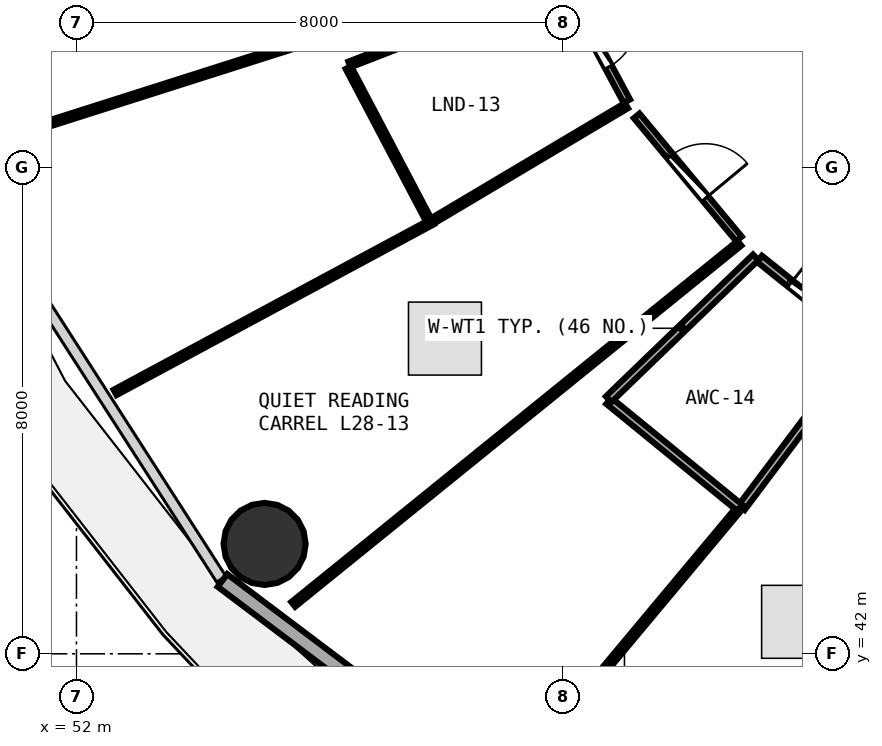
"""IFC4 building model, lengths in metres.
Left out: names, types, materials, properties, quantities, classifications, styles, units other than length and angle.
Written with IfcOpenShell. Run it as: python <this file> out.ifc"""

import sys

from ifc_helpers import new_model, si_unit, direction, frame, frame_2d, origin, origin_2d, place, context, subcontext, project, spatial, rectangle, circle, extrude, element, fill, save


model = new_model("IFC4")
c1 = context("Model", 3, precision=1e-05, world=origin(), true_north=direction((0.0, 1.0)))
c2 = subcontext(c1, "Body", "Model", "MODEL_VIEW")
j1 = project(units=[si_unit("LENGTHUNIT", "METRE"), si_unit("PLANEANGLEUNIT", "RADIAN")], contexts=[c1])
p1 = place(None, origin())
s1 = spatial("IfcSite", under=j1, at=p1, CompositionType="ELEMENT")
p2 = place(p1, origin())
s2 = spatial("IfcBuilding", under=s1, at=p2, CompositionType="ELEMENT")
p3 = place(p2, frame((0.0, 0.0, 110.1)))
s3 = spatial("IfcBuildingStorey", under=s2, at=p3, CompositionType="ELEMENT", Elevation=110.1)
p4 = place(p3, frame((55.094, 43.807, 0.0), z_axis=(0.0, 0.0, 1.0), x_axis=(1.0, 0.0, 0.0)))
e1 = element("IfcColumn", 1, at=p4, inside=s3, PredefinedType="COLUMN", context=c2, shape_type="SweptSolid", body=[
    extrude(circle(Radius=0.675, at=origin_2d()), origin(), (0.0, 0.0, 1.0), 3.75),
])
p5 = place(p3, frame((54.401, 43.207, 0.0), z_axis=(0.0, 0.0, 1.0), x_axis=(0.798501507879, -0.601992808857, 0.0)))
e2 = element("IfcWall", 2, at=p5, inside=s3, PredefinedType="SOLIDWALL", context=c2, shape_type="SweptSolid", body=[
    extrude(rectangle(XDim=8.499, YDim=0.26, at=frame_2d((4.25, 0.0))), origin(), (0.0, 0.0, 1.0), 3.475),
])
p6 = place(p5, frame((3.45, 0.0, 0.85)))
e3 = element("IfcOpeningElement", 3, at=p6, cuts=e2, PredefinedType="OPENING", context=c2, shape_type="SweptSolid", body=[
    extrude(rectangle(XDim=1.6, YDim=1.45, at=frame_2d((0.8, 0.725))), frame((0.0, 0.14, 0.0), z_axis=(0.0, -1.0, 0.0), x_axis=(1.0, 0.0, 0.0)), (0.0, 0.0, 1.0), 0.28),
])
p7 = place(p3, frame((60.022, 53.002, 0.0), z_axis=(0.0, 0.0, 1.0), x_axis=(0.473670876771, -0.880701936241, 0.0)))
e4 = element("IfcWall", 4, at=p7, inside=s3, PredefinedType="PARTITIONING", context=c2, shape_type="SweptSolid", body=[
    extrude(rectangle(XDim=2.173, YDim=0.12, at=frame_2d((1.086, 0.0))), origin(), (0.0, 0.0, 1.0), 3.235),
])
p8 = place(p7, frame((0.636, 0.0, 0.0)))
e5 = element("IfcOpeningElement", 5, at=p8, cuts=e4, PredefinedType="OPENING", context=c2, shape_type="SweptSolid", body=[
    extrude(rectangle(XDim=0.9, YDim=2.08, at=frame_2d((0.45, 1.04))), frame((0.0, 0.07, 0.0), z_axis=(0.0, -1.0, 0.0), x_axis=(1.0, 0.0, 0.0)), (0.0, 0.0, 1.0), 0.14),
])
p9 = place(p3, frame((61.213, 50.847, 0.0), z_axis=(0.0, 0.0, 1.0), x_axis=(0.639180120379, -0.769057067916, 0.0)))
e6 = element("IfcWall", 6, at=p9, inside=s3, PredefinedType="PARTITIONING", context=c2, shape_type="SweptSolid", body=[
    extrude(rectangle(XDim=2.632, YDim=0.12, at=frame_2d((1.316, 0.0))), origin(), (0.0, 0.0, 1.0), 2.925),
])
p10 = place(p9, frame((0.866, 0.0, 0.0)))
e7 = element("IfcOpeningElement", 7, at=p10, cuts=e6, PredefinedType="OPENING", context=c2, shape_type="SweptSolid", body=[
    extrude(rectangle(XDim=0.9, YDim=2.08, at=frame_2d((0.45, 1.04))), frame((0.0, 0.07, 0.0), z_axis=(0.0, -1.0, 0.0), x_axis=(1.0, 0.0, 0.0)), (0.0, 0.0, 1.0), 0.14),
])
p11 = place(p3, frame((63.233, 48.497, 0.0), z_axis=(0.0, 0.0, 1.0), x_axis=(0.780097789407, -0.625657605214, 0.0)))
e8 = element("IfcWall", 8, at=p11, inside=s3, PredefinedType="PLUMBINGWALL", context=c2, shape_type="SweptSolid", body=[
    extrude(rectangle(XDim=2.164, YDim=0.13, at=frame_2d((1.082, 0.0))), origin(), (0.0, 0.0, 1.0), 2.925),
])
p12 = place(p11, frame((0.652, 0.0, 0.0)))
e9 = element("IfcOpeningElement", 9, at=p12, cuts=e8, PredefinedType="OPENING", context=c2, shape_type="SweptSolid", body=[
    extrude(rectangle(XDim=0.86, YDim=2.05, at=frame_2d((0.43, 1.025))), frame((0.0, 0.075, 0.0), z_axis=(0.0, -1.0, 0.0), x_axis=(1.0, 0.0, 0.0)), (0.0, 0.0, 1.0), 0.15),
])
p13 = place(p3, frame((59.827, 53.355, 0.0), z_axis=(0.0, 0.0, 1.0), x_axis=(-0.952909703193, -0.30325417979, 0.0)))
e10 = element("IfcWall", 10, at=p13, inside=s3, PredefinedType="PARTITIONING", context=c2, shape_type="SweptSolid", body=[
    extrude(rectangle(XDim=8.776, YDim=0.1, at=frame_2d((4.388, 0.0))), origin(), (0.0, 0.0, 1.0), 3.175),
])
p14 = place(p3, frame((61.046, 51.016, 0.0), z_axis=(0.0, 0.0, 1.0), x_axis=(-0.859598985467, -0.510969259529, 0.0)))
e11 = element("IfcWall", 11, at=p14, inside=s3, PredefinedType="PARTITIONING", context=c2, shape_type="SweptSolid", body=[
    extrude(rectangle(XDim=3.721, YDim=0.1, at=frame_2d((1.86, 0.0))), origin(), (0.0, 0.0, 1.0), 2.925),
])
p15 = place(p3, frame((57.794, 49.129, 0.0), z_axis=(0.0, 0.0, 1.0), x_axis=(-0.465895277078, 0.884839867319, 0.0)))
e12 = element("IfcWall", 12, at=p15, inside=s3, PredefinedType="PARTITIONING", context=c2, shape_type="SweptSolid", body=[
    extrude(rectangle(XDim=2.839, YDim=0.1, at=frame_2d((1.419, 0.0))), origin(), (0.0, 0.0, 1.0), 2.925),
])
p16 = place(p3, frame((56.49, 51.691, 0.0), z_axis=(0.0, 0.0, 1.0), x_axis=(0.931912263443, 0.362683792365, 0.0)))
e13 = element("IfcWall", 13, at=p16, inside=s3, PredefinedType="PARTITIONING", context=c2, shape_type="SweptSolid", body=[
    extrude(rectangle(XDim=3.72, YDim=0.1, at=frame_2d((1.86, 0.0))), origin(), (0.0, 0.0, 1.0), 3.175),
])
p17 = place(p3, frame((62.903, 48.752, 0.0), z_axis=(0.0, 0.0, 1.0), x_axis=(-0.777323765608, -0.629100757766, 0.0)))
e14 = element("IfcWall", 14, at=p17, inside=s3, PredefinedType="PARTITIONING", context=c2, shape_type="SweptSolid", body=[
    extrude(rectangle(XDim=9.44, YDim=0.1, at=frame_2d((4.72, 0.0))), origin(), (0.0, 0.0, 1.0), 2.925),
])
p18 = place(p3, frame((52.634, 46.298, 0.0), z_axis=(0.0, 0.0, 1.0), x_axis=(0.880653600526, 0.473760736956, 0.0)))
e15 = element("IfcWall", 15, at=p18, inside=s3, PredefinedType="PARTITIONING", context=c2, shape_type="SweptSolid", body=[
    extrude(rectangle(XDim=5.926, YDim=0.1, at=frame_2d((2.963, 0.0))), origin(), (0.0, 0.0, 1.0), 2.975),
])
p19 = place(p3, frame((64.956, 47.089, 0.0), z_axis=(0.0, 0.0, 1.0), x_axis=(-0.600999501428, -0.799249397425, 0.0)))
e16 = element("IfcWall", 16, at=p19, inside=s3, PredefinedType="PLUMBINGWALL", context=c2, shape_type="SweptSolid", body=[
    extrude(rectangle(XDim=3.359, YDim=0.13, at=frame_2d((1.68, 0.0))), origin(), (0.0, 0.0, 1.0), 2.925),
])
p20 = place(p3, frame((62.909, 44.401, 0.0), z_axis=(0.0, 0.0, 1.0), x_axis=(-0.774562936157, 0.632496844207, 0.0)))
e17 = element("IfcWall", 17, at=p20, inside=s3, PredefinedType="PLUMBINGWALL", context=c2, shape_type="SweptSolid", body=[
    extrude(rectangle(XDim=2.782, YDim=0.13, at=frame_2d((1.391, 0.0))), origin(), (0.0, 0.0, 1.0), 3.48),
])
p21 = place(p3, frame((60.753, 46.187, 0.0), z_axis=(0.0, 0.0, 1.0), x_axis=(0.719671825867, 0.694314383441, 0.0)))
e18 = element("IfcWall", 18, at=p21, inside=s3, PredefinedType="PLUMBINGWALL", context=c2, shape_type="SweptSolid", body=[
    extrude(rectangle(XDim=3.36, YDim=0.13, at=frame_2d((1.68, 0.0))), origin(), (0.0, 0.0, 1.0), 3.235),
])
p22 = place(p3, frame((67.7, 45.582, 0.0), z_axis=(0.0, 0.0, 1.0), x_axis=(-0.462926984727, -0.88639641629, 0.0)))
e19 = element("IfcWall", 19, at=p22, inside=s3, PredefinedType="PARTITIONING", context=c2, shape_type="SweptSolid", body=[
    extrude(rectangle(XDim=8.99, YDim=0.1, at=frame_2d((4.495, 0.0))), origin(), (0.0, 0.0, 1.0), 2.925),
])
p23 = place(p3, frame((59.166, 39.922, 0.0), z_axis=(0.0, 0.0, 1.0), x_axis=(0.641042435707, 0.767505436869, 0.0)))
e20 = element("IfcWall", 20, at=p23, inside=s3, PredefinedType="PARTITIONING", context=c2, shape_type="SweptSolid", body=[
    extrude(rectangle(XDim=5.763, YDim=0.1, at=frame_2d((2.881, 0.0))), origin(), (0.0, 0.0, 1.0), 2.975),
])
p24 = place(p8, origin())
e21 = element("IfcDoor", 21, at=p24, inside=s3, OperationType="SINGLE_SWING_LEFT", PredefinedType="DOOR", context=c2, shape_type="SweptSolid", body=[
    extrude(rectangle(XDim=0.9, YDim=2.08, at=frame_2d((0.45, 1.04))), frame((0.0, 0.025, 0.0), z_axis=(0.0, -1.0, 0.0), x_axis=(1.0, 0.0, 0.0)), (0.0, 0.0, 1.0), 0.05),
])
fill(e5, e21)
p25 = place(p10, origin())
e22 = element("IfcDoor", 22, at=p25, inside=s3, OperationType="SINGLE_SWING_RIGHT", PredefinedType="DOOR", context=c2, shape_type="SweptSolid", body=[
    extrude(rectangle(XDim=0.9, YDim=2.08, at=frame_2d((0.45, 1.04))), frame((0.0, 0.025, 0.0), z_axis=(0.0, -1.0, 0.0), x_axis=(1.0, 0.0, 0.0)), (0.0, 0.0, 1.0), 0.05),
])
fill(e7, e22)
p26 = place(p12, origin())
e23 = element("IfcDoor", 23, at=p26, inside=s3, OperationType="SINGLE_SWING_LEFT", PredefinedType="DOOR", context=c2, shape_type="SweptSolid", body=[
    extrude(rectangle(XDim=0.86, YDim=2.05, at=frame_2d((0.43, 1.025))), frame((0.0, 0.025, 0.0), z_axis=(0.0, -1.0, 0.0), x_axis=(1.0, 0.0, 0.0)), (0.0, 0.0, 1.0), 0.05),
])
fill(e9, e23)
save(model, sys.argv[1])
